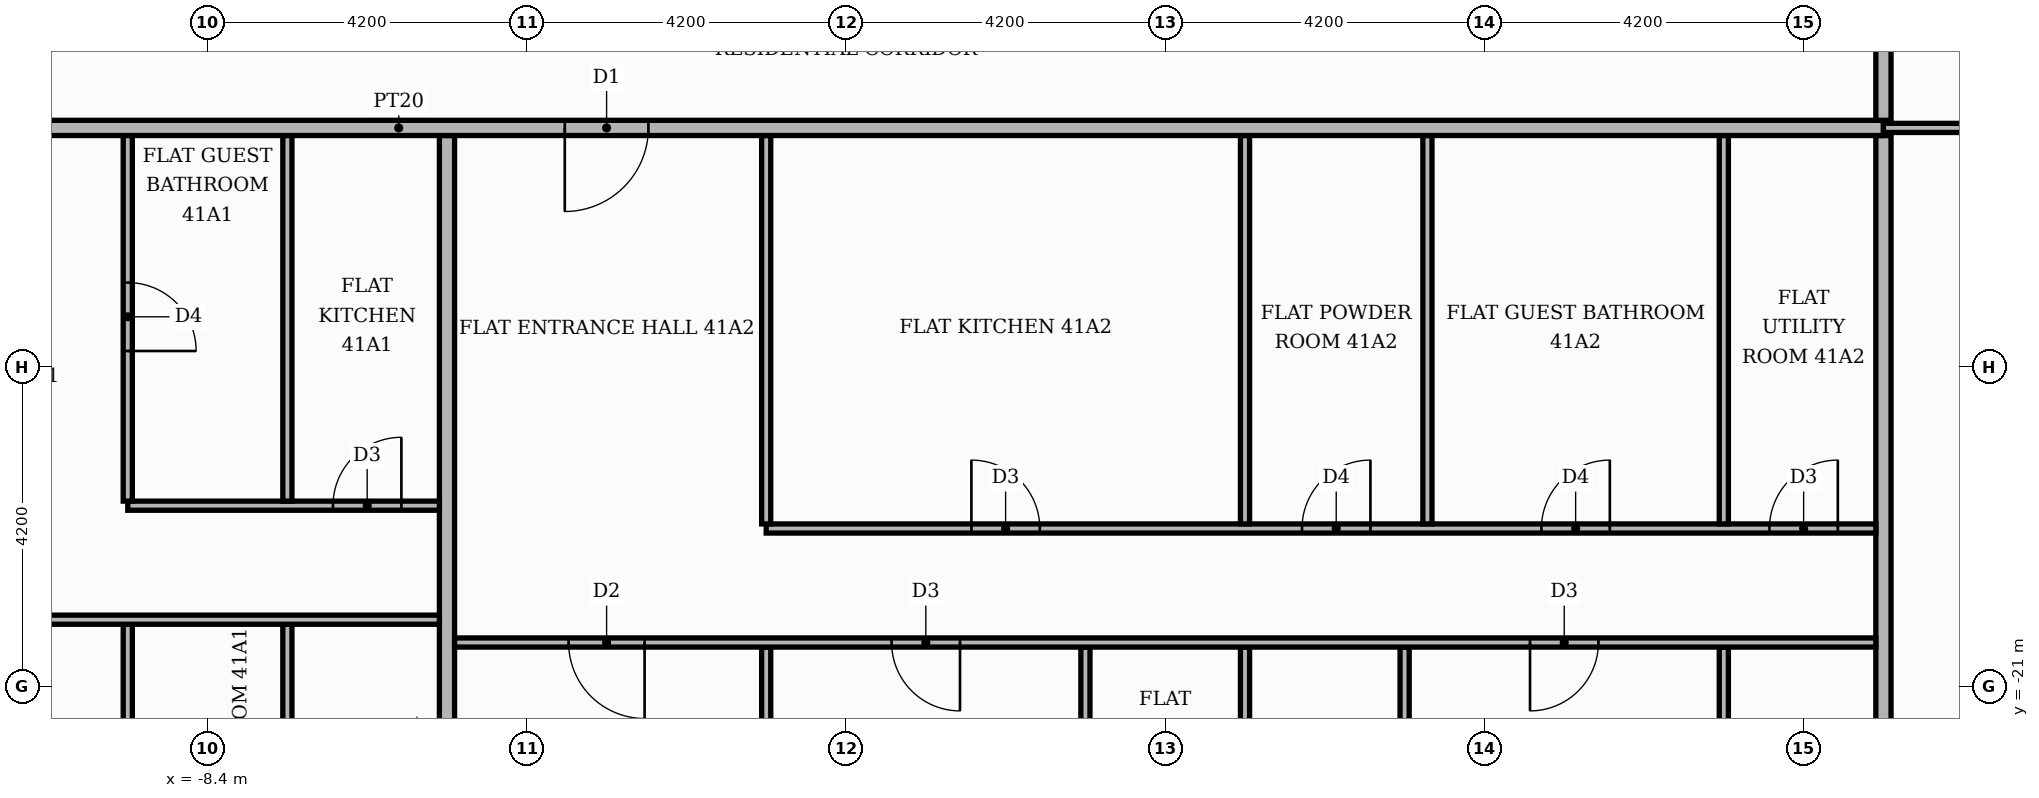
"""IFC4 building model, lengths in metres.
Left out: names, types, materials, properties, quantities, classifications, styles, units other than length and angle.
Written with IfcOpenShell. Run it as: python <this file> out.ifc"""

import sys

from ifc_helpers import new_model, si_unit, direction, frame, frame_2d, origin, place, context, subcontext, project, spatial, rectangle, extrude, element, fill, save


model = new_model("IFC4")
c1 = context("Model", 3, precision=1e-05, world=origin(), true_north=direction((0.0, 1.0)))
c2 = subcontext(c1, "Body", "Model", "MODEL_VIEW")
j1 = project(units=[si_unit("LENGTHUNIT", "METRE"), si_unit("PLANEANGLEUNIT", "RADIAN")], contexts=[c1])
p1 = place(None, origin())
s1 = spatial("IfcSite", under=j1, at=p1, CompositionType="ELEMENT")
p2 = place(p1, origin())
s2 = spatial("IfcBuilding", under=s1, at=p2, CompositionType="ELEMENT")
p3 = place(p2, frame((0.0, 0.0, 172.8)))
s3 = spatial("IfcBuildingStorey", under=s2, at=p3, CompositionType="ELEMENT", Elevation=172.8)
p4 = place(p3, frame((-9.45, -25.42, 0.0), z_axis=(0.0, 0.0, 1.0), x_axis=(0.0, 1.0, 0.0)))
e1 = element("IfcWall", 1, at=p4, inside=s3, PredefinedType="PARTITIONING", context=c2, shape_type="SweptSolid", body=[
    extrude(rectangle(XDim=5.24, YDim=0.12, at=frame_2d((2.62, 0.0))), origin(), (0.0, 0.0, 1.0), 3.48),
])
p5 = place(p4, frame((2.05, 0.0, 0.0)))
e2 = element("IfcOpeningElement", 2, at=p5, cuts=e1, PredefinedType="OPENING", context=c2, shape_type="SweptSolid", body=[
    extrude(rectangle(XDim=0.9, YDim=2.1, at=frame_2d((0.45, 1.05))), frame((0.0, 0.07, 0.0), z_axis=(0.0, -1.0, 0.0), x_axis=(1.0, 0.0, 0.0)), (0.0, 0.0, 1.0), 0.14),
])
p6 = place(p3, frame((-7.35, -25.42, 0.0), z_axis=(0.0, 0.0, 1.0), x_axis=(0.0, 1.0, 0.0)))
e3 = element("IfcWall", 3, at=p6, inside=s3, PredefinedType="PARTITIONING", context=c2, shape_type="SweptSolid", body=[
    extrude(rectangle(XDim=5.24, YDim=0.12, at=frame_2d((2.62, 0.0))), origin(), (0.0, 0.0, 1.0), 3.48),
])
p7 = place(p6, frame((2.05, 0.0, 0.0)))
e4 = element("IfcOpeningElement", 4, at=p7, cuts=e3, PredefinedType="OPENING", context=c2, shape_type="SweptSolid", body=[
    extrude(rectangle(XDim=0.9, YDim=2.1, at=frame_2d((0.45, 1.05))), frame((0.0, 0.07, 0.0), z_axis=(0.0, -1.0, 0.0), x_axis=(1.0, 0.0, 0.0)), (0.0, 0.0, 1.0), 0.14),
])
p8 = place(p3, frame((-5.25, -25.42, 0.0), z_axis=(0.0, 0.0, 1.0), x_axis=(0.0, 1.0, 0.0)))
e5 = element("IfcWall", 5, at=p8, inside=s3, PredefinedType="PARTITIONING", context=c2, shape_type="SweptSolid", body=[
    extrude(rectangle(XDim=11.67, YDim=0.2, at=frame_2d((5.835, 0.0))), origin(), (0.0, 0.0, 1.0), 3.48),
])
p9 = place(p3, frame((-1.05, -25.42, 0.0), z_axis=(0.0, 0.0, 1.0), x_axis=(0.0, 1.0, 0.0)))
e6 = element("IfcWall", 6, at=p9, inside=s3, PredefinedType="PARTITIONING", context=c2, shape_type="SweptSolid", body=[
    extrude(rectangle(XDim=4.94, YDim=0.12, at=frame_2d((2.47, 0.0))), origin(), (0.0, 0.0, 1.0), 3.48),
])
p10 = place(p3, frame((3.15, -25.42, 0.0), z_axis=(0.0, 0.0, 1.0), x_axis=(0.0, 1.0, 0.0)))
e7 = element("IfcWall", 7, at=p10, inside=s3, PredefinedType="PARTITIONING", context=c2, shape_type="SweptSolid", body=[
    extrude(rectangle(XDim=4.94, YDim=0.12, at=frame_2d((2.47, 0.0))), origin(), (0.0, 0.0, 1.0), 3.48),
])
p11 = place(p10, frame((1.9, 0.0, 0.0)))
e8 = element("IfcOpeningElement", 8, at=p11, cuts=e7, PredefinedType="OPENING", context=c2, shape_type="SweptSolid", body=[
    extrude(rectangle(XDim=0.9, YDim=2.1, at=frame_2d((0.45, 1.05))), frame((0.0, 0.07, 0.0), z_axis=(0.0, -1.0, 0.0), x_axis=(1.0, 0.0, 0.0)), (0.0, 0.0, 1.0), 0.14),
])
p12 = place(p3, frame((5.25, -25.42, 0.0), z_axis=(0.0, 0.0, 1.0), x_axis=(0.0, 1.0, 0.0)))
e9 = element("IfcWall", 9, at=p12, inside=s3, PredefinedType="PARTITIONING", context=c2, shape_type="SweptSolid", body=[
    extrude(rectangle(XDim=4.94, YDim=0.12, at=frame_2d((2.47, 0.0))), origin(), (0.0, 0.0, 1.0), 3.48),
])
p13 = place(p12, frame((1.9, 0.0, 0.0)))
e10 = element("IfcOpeningElement", 10, at=p13, cuts=e9, PredefinedType="OPENING", context=c2, shape_type="SweptSolid", body=[
    extrude(rectangle(XDim=0.9, YDim=2.1, at=frame_2d((0.45, 1.05))), frame((0.0, 0.07, 0.0), z_axis=(0.0, -1.0, 0.0), x_axis=(1.0, 0.0, 0.0)), (0.0, 0.0, 1.0), 0.14),
])
p14 = place(p3, frame((7.35, -25.42, 0.0), z_axis=(0.0, 0.0, 1.0), x_axis=(0.0, 1.0, 0.0)))
e11 = element("IfcWall", 11, at=p14, inside=s3, PredefinedType="PARTITIONING", context=c2, shape_type="SweptSolid", body=[
    extrude(rectangle(XDim=4.94, YDim=0.12, at=frame_2d((2.47, 0.0))), origin(), (0.0, 0.0, 1.0), 3.48),
])
p15 = place(p3, frame((11.55, -25.42, 0.0), z_axis=(0.0, 0.0, 1.0), x_axis=(0.0, 1.0, 0.0)))
e12 = element("IfcWall", 12, at=p15, inside=s3, PredefinedType="PARTITIONING", context=c2, shape_type="SweptSolid", body=[
    extrude(rectangle(XDim=4.94, YDim=0.12, at=frame_2d((2.47, 0.0))), origin(), (0.0, 0.0, 1.0), 3.48),
])
p16 = place(p15, frame((1.9, 0.0, 0.0)))
e13 = element("IfcOpeningElement", 13, at=p16, cuts=e12, PredefinedType="OPENING", context=c2, shape_type="SweptSolid", body=[
    extrude(rectangle(XDim=0.9, YDim=2.1, at=frame_2d((0.45, 1.05))), frame((0.0, 0.07, 0.0), z_axis=(0.0, -1.0, 0.0), x_axis=(1.0, 0.0, 0.0)), (0.0, 0.0, 1.0), 0.14),
])
p17 = place(p3, frame((13.65, -25.42, 0.0), z_axis=(0.0, 0.0, 1.0), x_axis=(0.0, 1.0, 0.0)))
e14 = element("IfcWall", 14, at=p17, inside=s3, PredefinedType="PARTITIONING", context=c2, shape_type="SweptSolid", body=[
    extrude(rectangle(XDim=11.67, YDim=0.2, at=frame_2d((5.835, 0.0))), origin(), (0.0, 0.0, 1.0), 3.48),
])
p18 = place(p3, frame((-5.15, -20.42, 0.0), z_axis=(0.0, 0.0, 1.0), x_axis=(1.0, 0.0, 0.0)))
e15 = element("IfcWall", 15, at=p18, inside=s3, PredefinedType="PARTITIONING", context=c2, shape_type="SweptSolid", body=[
    extrude(rectangle(XDim=18.7, YDim=0.12, at=frame_2d((9.35, 0.0))), origin(), (0.0, 0.0, 1.0), 3.48),
])
p19 = place(p18, frame((1.5, 0.0, 0.0)))
e16 = element("IfcOpeningElement", 16, at=p19, cuts=e15, PredefinedType="OPENING", context=c2, shape_type="SweptSolid", body=[
    extrude(rectangle(XDim=1.0, YDim=2.1, at=frame_2d((0.5, 1.05))), frame((0.0, 0.07, 0.0), z_axis=(0.0, -1.0, 0.0), x_axis=(1.0, 0.0, 0.0)), (0.0, 0.0, 1.0), 0.14),
])
p20 = place(p18, frame((5.75, 0.0, 0.0)))
e17 = element("IfcOpeningElement", 17, at=p20, cuts=e15, PredefinedType="OPENING", context=c2, shape_type="SweptSolid", body=[
    extrude(rectangle(XDim=0.9, YDim=2.1, at=frame_2d((0.45, 1.05))), frame((0.0, 0.07, 0.0), z_axis=(0.0, -1.0, 0.0), x_axis=(1.0, 0.0, 0.0)), (0.0, 0.0, 1.0), 0.14),
])
p21 = place(p18, frame((14.15, 0.0, 0.0)))
e18 = element("IfcOpeningElement", 18, at=p21, cuts=e15, PredefinedType="OPENING", context=c2, shape_type="SweptSolid", body=[
    extrude(rectangle(XDim=0.9, YDim=2.1, at=frame_2d((0.45, 1.05))), frame((0.0, 0.07, 0.0), z_axis=(0.0, -1.0, 0.0), x_axis=(1.0, 0.0, 0.0)), (0.0, 0.0, 1.0), 0.14),
])
p22 = place(p3, frame((-25.42, -20.12, 0.0), z_axis=(0.0, 0.0, 1.0), x_axis=(1.0, 0.0, 0.0)))
e19 = element("IfcWall", 19, at=p22, inside=s3, PredefinedType="PARTITIONING", context=c2, shape_type="SweptSolid", body=[
    extrude(rectangle(XDim=20.07, YDim=0.12, at=frame_2d((10.035, 0.0))), origin(), (0.0, 0.0, 1.0), 3.48),
])
p23 = place(p22, frame((10.22, 0.0, 0.0)))
e20 = element("IfcOpeningElement", 20, at=p23, cuts=e19, PredefinedType="OPENING", context=c2, shape_type="SweptSolid", body=[
    extrude(rectangle(XDim=1.0, YDim=2.1, at=frame_2d((0.5, 1.05))), frame((0.0, 0.07, 0.0), z_axis=(0.0, -1.0, 0.0), x_axis=(1.0, 0.0, 0.0)), (0.0, 0.0, 1.0), 0.14),
])
p24 = place(p22, frame((13.42, 0.0, 0.0)))
e21 = element("IfcOpeningElement", 21, at=p24, cuts=e19, PredefinedType="OPENING", context=c2, shape_type="SweptSolid", body=[
    extrude(rectangle(XDim=0.9, YDim=2.1, at=frame_2d((0.45, 1.05))), frame((0.0, 0.07, 0.0), z_axis=(0.0, -1.0, 0.0), x_axis=(1.0, 0.0, 0.0)), (0.0, 0.0, 1.0), 0.14),
])
p25 = place(p3, frame((-1.05, -18.92, 0.0), z_axis=(0.0, 0.0, 1.0), x_axis=(1.0, 0.0, 0.0)))
e22 = element("IfcWall", 22, at=p25, inside=s3, PredefinedType="PARTITIONING", context=c2, shape_type="SweptSolid", body=[
    extrude(rectangle(XDim=14.6, YDim=0.12, at=frame_2d((7.3, 0.0))), origin(), (0.0, 0.0, 1.0), 3.48),
])
p26 = place(p25, frame((2.7, 0.0, 0.0)))
e23 = element("IfcOpeningElement", 23, at=p26, cuts=e22, PredefinedType="OPENING", context=c2, shape_type="SweptSolid", body=[
    extrude(rectangle(XDim=0.9, YDim=2.1, at=frame_2d((0.45, 1.05))), frame((0.0, 0.07, 0.0), z_axis=(0.0, -1.0, 0.0), x_axis=(1.0, 0.0, 0.0)), (0.0, 0.0, 1.0), 0.14),
])
p27 = place(p25, frame((7.05, 0.0, 0.0)))
e24 = element("IfcOpeningElement", 24, at=p27, cuts=e22, PredefinedType="OPENING", context=c2, shape_type="SweptSolid", body=[
    extrude(rectangle(XDim=0.9, YDim=2.1, at=frame_2d((0.45, 1.05))), frame((0.0, 0.07, 0.0), z_axis=(0.0, -1.0, 0.0), x_axis=(1.0, 0.0, 0.0)), (0.0, 0.0, 1.0), 0.14),
])
p28 = place(p25, frame((10.2, 0.0, 0.0)))
e25 = element("IfcOpeningElement", 25, at=p28, cuts=e22, PredefinedType="OPENING", context=c2, shape_type="SweptSolid", body=[
    extrude(rectangle(XDim=0.9, YDim=2.1, at=frame_2d((0.45, 1.05))), frame((0.0, 0.07, 0.0), z_axis=(0.0, -1.0, 0.0), x_axis=(1.0, 0.0, 0.0)), (0.0, 0.0, 1.0), 0.14),
])
p29 = place(p25, frame((13.2, 0.0, 0.0)))
e26 = element("IfcOpeningElement", 26, at=p29, cuts=e22, PredefinedType="OPENING", context=c2, shape_type="SweptSolid", body=[
    extrude(rectangle(XDim=0.9, YDim=2.1, at=frame_2d((0.45, 1.05))), frame((0.0, 0.07, 0.0), z_axis=(0.0, -1.0, 0.0), x_axis=(1.0, 0.0, 0.0)), (0.0, 0.0, 1.0), 0.14),
])
for number, where, z_axis, x_axis in (
    (27, (-1.05, -18.86, 0.0), (0.0, 0.0, 1.0), (0.0, 1.0, 0.0)),
    (28, (5.25, -18.86, 0.0), (0.0, 0.0, 1.0), (0.0, 1.0, 0.0)),
    (29, (7.65, -18.86, 0.0), (0.0, 0.0, 1.0), (0.0, 1.0, 0.0)),
    (30, (11.55, -18.86, 0.0), (0.0, 0.0, 1.0), (0.0, 1.0, 0.0)),
):
    element("IfcWall", number, at=place(p3, frame(where, z_axis=z_axis, x_axis=x_axis)), inside=s3, PredefinedType="PARTITIONING", context=c2, shape_type="SweptSolid", body=[
        extrude(rectangle(XDim=5.11, YDim=0.12, at=frame_2d((2.555, 0.0))), origin(), (0.0, 0.0, 1.0), 3.48),
    ])
p30 = place(p3, frame((-9.45, -18.62, 0.0), z_axis=(0.0, 0.0, 1.0), x_axis=(1.0, 0.0, 0.0)))
e31 = element("IfcWall", 31, at=p30, inside=s3, PredefinedType="PARTITIONING", context=c2, shape_type="SweptSolid", body=[
    extrude(rectangle(XDim=4.1, YDim=0.12, at=frame_2d((2.05, 0.0))), origin(), (0.0, 0.0, 1.0), 3.48),
])
p31 = place(p30, frame((2.7, 0.0, 0.0)))
e32 = element("IfcOpeningElement", 32, at=p31, cuts=e31, PredefinedType="OPENING", context=c2, shape_type="SweptSolid", body=[
    extrude(rectangle(XDim=0.9, YDim=2.1, at=frame_2d((0.45, 1.05))), frame((0.0, 0.07, 0.0), z_axis=(0.0, -1.0, 0.0), x_axis=(1.0, 0.0, 0.0)), (0.0, 0.0, 1.0), 0.14),
])
p32 = place(p3, frame((-9.45, -18.56, 0.0), z_axis=(0.0, 0.0, 1.0), x_axis=(0.0, 1.0, 0.0)))
e33 = element("IfcWall", 33, at=p32, inside=s3, PredefinedType="PARTITIONING", context=c2, shape_type="SweptSolid", body=[
    extrude(rectangle(XDim=4.81, YDim=0.12, at=frame_2d((2.405, 0.0))), origin(), (0.0, 0.0, 1.0), 3.48),
])
p33 = place(p32, frame((1.975, 0.0, 0.0)))
e34 = element("IfcOpeningElement", 34, at=p33, cuts=e33, PredefinedType="OPENING", context=c2, shape_type="SweptSolid", body=[
    extrude(rectangle(XDim=0.9, YDim=2.1, at=frame_2d((0.45, 1.05))), frame((0.0, 0.07, 0.0), z_axis=(0.0, -1.0, 0.0), x_axis=(1.0, 0.0, 0.0)), (0.0, 0.0, 1.0), 0.14),
])
p34 = place(p3, frame((-7.35, -18.56, 0.0), z_axis=(0.0, 0.0, 1.0), x_axis=(0.0, 1.0, 0.0)))
e35 = element("IfcWall", 35, at=p34, inside=s3, PredefinedType="PARTITIONING", context=c2, shape_type="SweptSolid", body=[
    extrude(rectangle(XDim=4.81, YDim=0.12, at=frame_2d((2.405, 0.0))), origin(), (0.0, 0.0, 1.0), 3.48),
])
p35 = place(p3, frame((-25.42, -13.65, 0.0), z_axis=(0.0, 0.0, 1.0), x_axis=(1.0, 0.0, 0.0)))
e36 = element("IfcWall", 36, at=p35, inside=s3, PredefinedType="PARTITIONING", context=c2, shape_type="SweptSolid", body=[
    extrude(rectangle(XDim=39.07, YDim=0.2, at=frame_2d((19.535, 0.0))), origin(), (0.0, 0.0, 1.0), 3.48),
])
p36 = place(p35, frame((13.32, 0.0, 0.0)))
e37 = element("IfcOpeningElement", 37, at=p36, cuts=e36, PredefinedType="OPENING", context=c2, shape_type="SweptSolid", body=[
    extrude(rectangle(XDim=1.1, YDim=2.4, at=frame_2d((0.55, 1.2))), frame((0.0, 0.11, 0.0), z_axis=(0.0, -1.0, 0.0), x_axis=(1.0, 0.0, 0.0)), (0.0, 0.0, 1.0), 0.22),
])
p37 = place(p35, frame((21.72, 0.0, 0.0)))
e38 = element("IfcOpeningElement", 38, at=p37, cuts=e36, PredefinedType="OPENING", context=c2, shape_type="SweptSolid", body=[
    extrude(rectangle(XDim=1.1, YDim=2.4, at=frame_2d((0.55, 1.2))), frame((0.0, 0.11, 0.0), z_axis=(0.0, -1.0, 0.0), x_axis=(1.0, 0.0, 0.0)), (0.0, 0.0, 1.0), 0.22),
])
p38 = place(p3, frame((13.65, -13.65, 0.0), z_axis=(0.0, 0.0, 1.0), x_axis=(1.0, 0.0, 0.0)))
e39 = element("IfcWall", 39, at=p38, inside=s3, PredefinedType="PARTITIONING", context=c2, shape_type="SweptSolid", body=[
    extrude(rectangle(XDim=6.47, YDim=0.12, at=frame_2d((3.235, 0.0))), origin(), (0.0, 0.0, 1.0), 3.48),
])
p39 = place(p38, frame((2.785, 0.0, 0.0)))
e40 = element("IfcOpeningElement", 40, at=p39, cuts=e39, PredefinedType="OPENING", context=c2, shape_type="SweptSolid", body=[
    extrude(rectangle(XDim=0.9, YDim=2.1, at=frame_2d((0.45, 1.05))), frame((0.0, 0.07, 0.0), z_axis=(0.0, -1.0, 0.0), x_axis=(1.0, 0.0, 0.0)), (0.0, 0.0, 1.0), 0.14),
])
p40 = place(p3, frame((13.65, -13.55, 0.0), z_axis=(0.0, 0.0, 1.0), x_axis=(0.0, 1.0, 0.0)))
e41 = element("IfcWall", 41, at=p40, inside=s3, PredefinedType="PARTITIONING", context=c2, shape_type="SweptSolid", body=[
    extrude(rectangle(XDim=2.45, YDim=0.2, at=frame_2d((1.225, 0.0))), origin(), (0.0, 0.0, 1.0), 3.48),
])
p41 = place(p33, frame((0.9, 0.0, 0.0), z_axis=(0.0, 0.0, 1.0), x_axis=(-1.0, 0.0, 0.0)))
e42 = element("IfcDoor", 42, at=p41, inside=s3, OperationType="SINGLE_SWING_LEFT", PredefinedType="DOOR", context=c2, shape_type="SweptSolid", body=[
    extrude(rectangle(XDim=0.9, YDim=2.1, at=frame_2d((0.45, 1.05))), frame((0.0, 0.025, 0.0), z_axis=(0.0, -1.0, 0.0), x_axis=(1.0, 0.0, 0.0)), (0.0, 0.0, 1.0), 0.05),
])
fill(e34, e42)
p42 = place(p31, origin())
e43 = element("IfcDoor", 43, at=p42, inside=s3, OperationType="SINGLE_SWING_RIGHT", PredefinedType="DOOR", context=c2, shape_type="SweptSolid", body=[
    extrude(rectangle(XDim=0.9, YDim=2.1, at=frame_2d((0.45, 1.05))), frame((0.0, 0.025, 0.0), z_axis=(0.0, -1.0, 0.0), x_axis=(1.0, 0.0, 0.0)), (0.0, 0.0, 1.0), 0.05),
])
fill(e32, e43)
p43 = place(p37, frame((1.1, 0.0, 0.0), z_axis=(0.0, 0.0, 1.0), x_axis=(-1.0, 0.0, 0.0)))
e44 = element("IfcDoor", 44, at=p43, inside=s3, OperationType="SINGLE_SWING_LEFT", PredefinedType="DOOR", context=c2, shape_type="SweptSolid", body=[
    extrude(rectangle(XDim=1.1, YDim=2.4, at=frame_2d((0.55, 1.2))), frame((0.0, 0.025, 0.0), z_axis=(0.0, -1.0, 0.0), x_axis=(1.0, 0.0, 0.0)), (0.0, 0.0, 1.0), 0.05),
])
fill(e38, e44)
p44 = place(p26, origin())
e45 = element("IfcDoor", 45, at=p44, inside=s3, OperationType="SINGLE_SWING_LEFT", PredefinedType="DOOR", context=c2, shape_type="SweptSolid", body=[
    extrude(rectangle(XDim=0.9, YDim=2.1, at=frame_2d((0.45, 1.05))), frame((0.0, 0.025, 0.0), z_axis=(0.0, -1.0, 0.0), x_axis=(1.0, 0.0, 0.0)), (0.0, 0.0, 1.0), 0.05),
])
fill(e23, e45)
p45 = place(p27, origin())
e46 = element("IfcDoor", 46, at=p45, inside=s3, OperationType="SINGLE_SWING_RIGHT", PredefinedType="DOOR", context=c2, shape_type="SweptSolid", body=[
    extrude(rectangle(XDim=0.9, YDim=2.1, at=frame_2d((0.45, 1.05))), frame((0.0, 0.025, 0.0), z_axis=(0.0, -1.0, 0.0), x_axis=(1.0, 0.0, 0.0)), (0.0, 0.0, 1.0), 0.05),
])
fill(e24, e46)
p46 = place(p28, origin())
e47 = element("IfcDoor", 47, at=p46, inside=s3, OperationType="SINGLE_SWING_RIGHT", PredefinedType="DOOR", context=c2, shape_type="SweptSolid", body=[
    extrude(rectangle(XDim=0.9, YDim=2.1, at=frame_2d((0.45, 1.05))), frame((0.0, 0.025, 0.0), z_axis=(0.0, -1.0, 0.0), x_axis=(1.0, 0.0, 0.0)), (0.0, 0.0, 1.0), 0.05),
])
fill(e25, e47)
p47 = place(p29, origin())
e48 = element("IfcDoor", 48, at=p47, inside=s3, OperationType="SINGLE_SWING_RIGHT", PredefinedType="DOOR", context=c2, shape_type="SweptSolid", body=[
    extrude(rectangle(XDim=0.9, YDim=2.1, at=frame_2d((0.45, 1.05))), frame((0.0, 0.025, 0.0), z_axis=(0.0, -1.0, 0.0), x_axis=(1.0, 0.0, 0.0)), (0.0, 0.0, 1.0), 0.05),
])
fill(e26, e48)
p48 = place(p19, frame((1.0, 0.0, 0.0), z_axis=(0.0, 0.0, 1.0), x_axis=(-1.0, 0.0, 0.0)))
e49 = element("IfcDoor", 49, at=p48, inside=s3, OperationType="SINGLE_SWING_RIGHT", PredefinedType="DOOR", context=c2, shape_type="SweptSolid", body=[
    extrude(rectangle(XDim=1.0, YDim=2.1, at=frame_2d((0.5, 1.05))), frame((0.0, 0.025, 0.0), z_axis=(0.0, -1.0, 0.0), x_axis=(1.0, 0.0, 0.0)), (0.0, 0.0, 1.0), 0.05),
])
fill(e16, e49)
p49 = place(p20, frame((0.9, 0.0, 0.0), z_axis=(0.0, 0.0, 1.0), x_axis=(-1.0, 0.0, 0.0)))
e50 = element("IfcDoor", 50, at=p49, inside=s3, OperationType="SINGLE_SWING_RIGHT", PredefinedType="DOOR", context=c2, shape_type="SweptSolid", body=[
    extrude(rectangle(XDim=0.9, YDim=2.1, at=frame_2d((0.45, 1.05))), frame((0.0, 0.025, 0.0), z_axis=(0.0, -1.0, 0.0), x_axis=(1.0, 0.0, 0.0)), (0.0, 0.0, 1.0), 0.05),
])
fill(e17, e50)
p50 = place(p21, frame((0.9, 0.0, 0.0), z_axis=(0.0, 0.0, 1.0), x_axis=(-1.0, 0.0, 0.0)))
e51 = element("IfcDoor", 51, at=p50, inside=s3, OperationType="SINGLE_SWING_LEFT", PredefinedType="DOOR", context=c2, shape_type="SweptSolid", body=[
    extrude(rectangle(XDim=0.9, YDim=2.1, at=frame_2d((0.45, 1.05))), frame((0.0, 0.025, 0.0), z_axis=(0.0, -1.0, 0.0), x_axis=(1.0, 0.0, 0.0)), (0.0, 0.0, 1.0), 0.05),
])
fill(e18, e51)
save(model, sys.argv[1])
